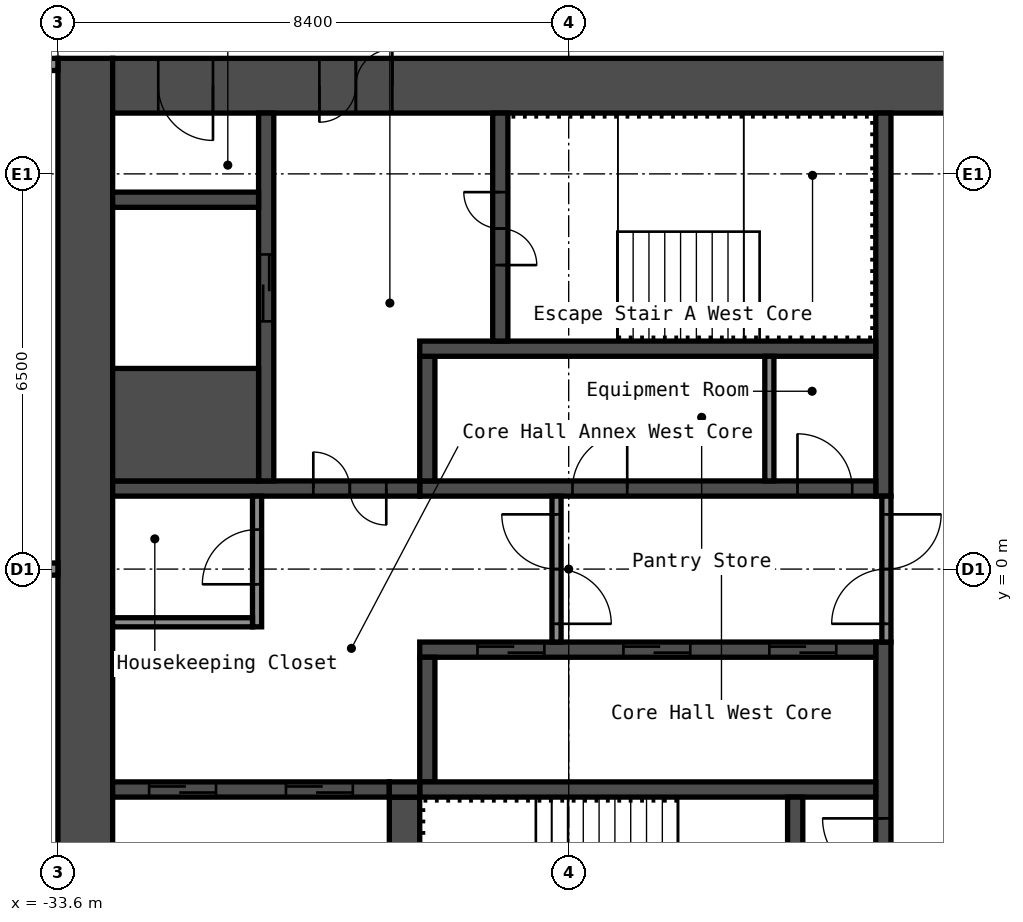
"""IFC4 building model, lengths in metres.
Left out: names, types, materials, properties, quantities, classifications, styles, units other than length and angle.
Written with IfcOpenShell. Run it as: python <this file> out.ifc"""

import sys

from ifc_helpers import new_model, si_unit, direction, frame, frame_2d, origin, place, context, subcontext, project, spatial, rectangle, extrude, element, fill, save


model = new_model("IFC4")
c1 = context("Model", 3, precision=1e-05, world=origin(), true_north=direction((0.0, 1.0)))
c2 = subcontext(c1, "Body", "Model", "MODEL_VIEW")
j1 = project(units=[si_unit("LENGTHUNIT", "METRE"), si_unit("PLANEANGLEUNIT", "RADIAN")], contexts=[c1])
p1 = place(None, origin())
s1 = spatial("IfcSite", under=j1, at=p1, CompositionType="ELEMENT")
p2 = place(p1, origin())
s2 = spatial("IfcBuilding", under=s1, at=p2, CompositionType="ELEMENT")
p3 = place(p2, frame((0.0, 0.0, 172.6)))
s3 = spatial("IfcBuildingStorey", under=s2, at=p3, CompositionType="ELEMENT", Elevation=172.6)
p4 = place(p3, frame((-33.15, -8.4, 0.0), z_axis=(0.0, 0.0, 1.0), x_axis=(0.0, 1.0, 0.0)))
e1 = element("IfcWall", 1, at=p4, inside=s3, PredefinedType="SHEAR", context=c2, shape_type="SweptSolid", body=[
    extrude(rectangle(XDim=16.8, YDim=0.9, at=frame_2d((8.4, 0.0))), origin(), (0.0, 0.0, 1.0), 2.9),
])
p5 = place(p3, frame((-32.7, 7.95, 0.0), z_axis=(0.0, 0.0, 1.0), x_axis=(1.0, 0.0, 0.0)))
e2 = element("IfcWall", 2, at=p5, inside=s3, PredefinedType="SHEAR", context=c2, shape_type="SweptSolid", body=[
    extrude(rectangle(XDim=15.0, YDim=0.9, at=frame_2d((7.5, 0.0))), origin(), (0.0, 0.0, 1.0), 2.9),
])
p6 = place(p5, frame((3.4, 0.0, 0.0)))
e3 = element("IfcOpeningElement", 3, at=p6, cuts=e2, PredefinedType="OPENING", context=c2, shape_type="SweptSolid", body=[
    extrude(rectangle(XDim=1.2, YDim=2.1, at=frame_2d((0.6, 1.05))), frame((0.0, 0.46, 0.0), z_axis=(0.0, -1.0, 0.0), x_axis=(1.0, 0.0, 0.0)), (0.0, 0.0, 1.0), 0.92),
])
p7 = place(p5, frame((0.75, 0.0, 0.0)))
e4 = element("IfcOpeningElement", 4, at=p7, cuts=e2, PredefinedType="OPENING", context=c2, shape_type="SweptSolid", body=[
    extrude(rectangle(XDim=0.9, YDim=2.1, at=frame_2d((0.45, 1.05))), frame((0.0, 0.46, 0.0), z_axis=(0.0, -1.0, 0.0), x_axis=(1.0, 0.0, 0.0)), (0.0, 0.0, 1.0), 0.92),
])
p8 = place(p3, frame((-20.025, 1.2, 0.0), z_axis=(0.0, 0.0, 1.0), x_axis=(0.0, 1.0, 0.0)))
e5 = element("IfcWall", 5, at=p8, inside=s3, PredefinedType="SHEAR", context=c2, shape_type="SweptSolid", body=[
    extrude(rectangle(XDim=6.3, YDim=0.25, at=frame_2d((3.15, 0.0))), origin(), (0.0, 0.0, 1.0), 2.9),
])
p9 = place(p3, frame((-20.025, -7.5, 0.0), z_axis=(0.0, 0.0, 1.0), x_axis=(0.0, 1.0, 0.0)))
e6 = element("IfcWall", 6, at=p9, inside=s3, PredefinedType="SHEAR", context=c2, shape_type="SweptSolid", body=[
    extrude(rectangle(XDim=6.3, YDim=0.25, at=frame_2d((3.15, 0.0))), origin(), (0.0, 0.0, 1.0), 2.9),
])
p10 = place(p9, frame((2.4, 0.0, 0.0)))
e7 = element("IfcOpeningElement", 7, at=p10, cuts=e6, PredefinedType="OPENING", context=c2, shape_type="SweptSolid", body=[
    extrude(rectangle(XDim=1.0, YDim=2.1, at=frame_2d((0.5, 1.05))), frame((0.0, 0.135, 0.0), z_axis=(0.0, -1.0, 0.0), x_axis=(1.0, 0.0, 0.0)), (0.0, 0.0, 1.0), 0.27),
])
p11 = place(p3, frame((-27.65, 1.325, 0.0), z_axis=(0.0, 0.0, 1.0), x_axis=(1.0, 0.0, 0.0)))
e8 = element("IfcWall", 8, at=p11, inside=s3, PredefinedType="SHEAR", context=c2, shape_type="SweptSolid", body=[
    extrude(rectangle(XDim=7.5, YDim=0.25, at=frame_2d((3.75, 0.0))), origin(), (0.0, 0.0, 1.0), 2.9),
])
p12 = place(p11, frame((6.212, 0.0, 0.0)))
e9 = element("IfcOpeningElement", 9, at=p12, cuts=e8, PredefinedType="OPENING", context=c2, shape_type="SweptSolid", body=[
    extrude(rectangle(XDim=0.9, YDim=2.1, at=frame_2d((0.45, 1.05))), frame((0.0, 0.135, 0.0), z_axis=(0.0, -1.0, 0.0), x_axis=(1.0, 0.0, 0.0)), (0.0, 0.0, 1.0), 0.27),
])
p13 = place(p11, frame((2.512, 0.0, 0.0)))
e10 = element("IfcOpeningElement", 10, at=p13, cuts=e8, PredefinedType="OPENING", context=c2, shape_type="SweptSolid", body=[
    extrude(rectangle(XDim=0.9, YDim=2.1, at=frame_2d((0.45, 1.05))), frame((0.0, 0.135, 0.0), z_axis=(0.0, -1.0, 0.0), x_axis=(1.0, 0.0, 0.0)), (0.0, 0.0, 1.0), 0.27),
])
p14 = place(p3, frame((-27.525, 1.45, 0.0), z_axis=(0.0, 0.0, 1.0), x_axis=(0.0, 1.0, 0.0)))
e11 = element("IfcWall", 11, at=p14, inside=s3, PredefinedType="SHEAR", context=c2, shape_type="SweptSolid", body=[
    extrude(rectangle(XDim=2.05, YDim=0.25, at=frame_2d((1.025, 0.0))), origin(), (0.0, 0.0, 1.0), 2.9),
])
p15 = place(p3, frame((-27.65, 3.625, 0.0), z_axis=(0.0, 0.0, 1.0), x_axis=(1.0, 0.0, 0.0)))
e12 = element("IfcWall", 12, at=p15, inside=s3, PredefinedType="SHEAR", context=c2, shape_type="SweptSolid", body=[
    extrude(rectangle(XDim=7.5, YDim=0.25, at=frame_2d((3.75, 0.0))), origin(), (0.0, 0.0, 1.0), 2.9),
])
p16 = place(p3, frame((-26.325, 3.75, 0.0), z_axis=(0.0, 0.0, 1.0), x_axis=(0.0, 1.0, 0.0)))
e13 = element("IfcWall", 13, at=p16, inside=s3, PredefinedType="SHEAR", context=c2, shape_type="SweptSolid", body=[
    extrude(rectangle(XDim=3.75, YDim=0.25, at=frame_2d((1.875, 0.0))), origin(), (0.0, 0.0, 1.0), 2.9),
])
p17 = place(p16, frame((1.25, 0.0, 0.0)))
e14 = element("IfcOpeningElement", 14, at=p17, cuts=e13, PredefinedType="OPENING", context=c2, shape_type="SweptSolid", body=[
    extrude(rectangle(XDim=1.2, YDim=2.1, at=frame_2d((0.6, 1.05))), frame((0.0, 0.135, 0.0), z_axis=(0.0, -1.0, 0.0), x_axis=(1.0, 0.0, 0.0)), (0.0, 0.0, 1.0), 0.27),
])
p18 = place(p3, frame((-32.7, 1.325, 0.0), z_axis=(0.0, 0.0, 1.0), x_axis=(1.0, 0.0, 0.0)))
e15 = element("IfcWall", 15, at=p18, inside=s3, PredefinedType="SHEAR", context=c2, shape_type="SweptSolid", body=[
    extrude(rectangle(XDim=5.05, YDim=0.25, at=frame_2d((2.525, 0.0))), origin(), (0.0, 0.0, 1.0), 2.9),
])
p19 = place(p18, frame((3.3, 0.0, 0.0)))
e16 = element("IfcOpeningElement", 16, at=p19, cuts=e15, PredefinedType="OPENING", context=c2, shape_type="SweptSolid", body=[
    extrude(rectangle(XDim=1.2, YDim=2.1, at=frame_2d((0.6, 1.05))), frame((0.0, 0.135, 0.0), z_axis=(0.0, -1.0, 0.0), x_axis=(1.0, 0.0, 0.0)), (0.0, 0.0, 1.0), 0.27),
])
p20 = place(p3, frame((-30.175, 1.45, 0.0), z_axis=(0.0, 0.0, 1.0), x_axis=(0.0, 1.0, 0.0)))
e17 = element("IfcWall", 17, at=p20, inside=s3, PredefinedType="SHEAR", context=c2, shape_type="SweptSolid", body=[
    extrude(rectangle(XDim=6.05, YDim=0.25, at=frame_2d((3.025, 0.0))), origin(), (0.0, 0.0, 1.0), 2.9),
])
p21 = place(p20, frame((2.625, 0.0, 0.0)))
e18 = element("IfcOpeningElement", 18, at=p21, cuts=e17, PredefinedType="OPENING", context=c2, shape_type="SweptSolid", body=[
    extrude(rectangle(XDim=1.1, YDim=2.1, at=frame_2d((0.55, 1.05))), frame((0.0, 0.135, 0.0), z_axis=(0.0, -1.0, 0.0), x_axis=(1.0, 0.0, 0.0)), (0.0, 0.0, 1.0), 0.27),
])
p22 = place(p3, frame((-32.7, 2.375, 0.0), z_axis=(0.0, 0.0, 1.0), x_axis=(1.0, 0.0, 0.0)))
e19 = element("IfcWall", 19, at=p22, inside=s3, PredefinedType="SHEAR", context=c2, shape_type="SweptSolid", body=[
    extrude(rectangle(XDim=2.4, YDim=1.85, at=frame_2d((1.2, 0.0))), origin(), (0.0, 0.0, 1.0), 2.9),
])
p23 = place(p3, frame((-32.7, 6.075, 0.0), z_axis=(0.0, 0.0, 1.0), x_axis=(1.0, 0.0, 0.0)))
e20 = element("IfcWall", 20, at=p23, inside=s3, PredefinedType="SHEAR", context=c2, shape_type="SweptSolid", body=[
    extrude(rectangle(XDim=2.4, YDim=0.25, at=frame_2d((1.2, 0.0))), origin(), (0.0, 0.0, 1.0), 2.9),
])
p24 = place(p3, frame((-27.65, -1.325, 0.0), z_axis=(0.0, 0.0, 1.0), x_axis=(1.0, 0.0, 0.0)))
e21 = element("IfcWall", 21, at=p24, inside=s3, PredefinedType="SHEAR", context=c2, shape_type="SweptSolid", body=[
    extrude(rectangle(XDim=7.5, YDim=0.25, at=frame_2d((3.75, 0.0))), origin(), (0.0, 0.0, 1.0), 2.9),
])
p25 = place(p24, frame((5.75, 0.0, 0.0)))
e22 = element("IfcOpeningElement", 22, at=p25, cuts=e21, PredefinedType="OPENING", context=c2, shape_type="SweptSolid", body=[
    extrude(rectangle(XDim=1.1, YDim=2.1, at=frame_2d((0.55, 1.05))), frame((0.0, 0.135, 0.0), z_axis=(0.0, -1.0, 0.0), x_axis=(1.0, 0.0, 0.0)), (0.0, 0.0, 1.0), 0.27),
])
p26 = place(p24, frame((3.35, 0.0, 0.0)))
e23 = element("IfcOpeningElement", 23, at=p26, cuts=e21, PredefinedType="OPENING", context=c2, shape_type="SweptSolid", body=[
    extrude(rectangle(XDim=1.1, YDim=2.1, at=frame_2d((0.55, 1.05))), frame((0.0, 0.135, 0.0), z_axis=(0.0, -1.0, 0.0), x_axis=(1.0, 0.0, 0.0)), (0.0, 0.0, 1.0), 0.27),
])
p27 = place(p24, frame((0.95, 0.0, 0.0)))
e24 = element("IfcOpeningElement", 24, at=p27, cuts=e21, PredefinedType="OPENING", context=c2, shape_type="SweptSolid", body=[
    extrude(rectangle(XDim=1.1, YDim=2.1, at=frame_2d((0.55, 1.05))), frame((0.0, 0.135, 0.0), z_axis=(0.0, -1.0, 0.0), x_axis=(1.0, 0.0, 0.0)), (0.0, 0.0, 1.0), 0.27),
])
p28 = place(p3, frame((-27.525, -3.5, 0.0), z_axis=(0.0, 0.0, 1.0), x_axis=(0.0, 1.0, 0.0)))
e25 = element("IfcWall", 25, at=p28, inside=s3, PredefinedType="SHEAR", context=c2, shape_type="SweptSolid", body=[
    extrude(rectangle(XDim=2.05, YDim=0.25, at=frame_2d((1.025, 0.0))), origin(), (0.0, 0.0, 1.0), 2.9),
])
p29 = place(p3, frame((-27.65, -3.625, 0.0), z_axis=(0.0, 0.0, 1.0), x_axis=(1.0, 0.0, 0.0)))
e26 = element("IfcWall", 26, at=p29, inside=s3, PredefinedType="SHEAR", context=c2, shape_type="SweptSolid", body=[
    extrude(rectangle(XDim=7.5, YDim=0.25, at=frame_2d((3.75, 0.0))), origin(), (0.0, 0.0, 1.0), 2.9),
])
p30 = place(p3, frame((-21.475, -7.5, 0.0), z_axis=(0.0, 0.0, 1.0), x_axis=(0.0, 1.0, 0.0)))
e27 = element("IfcWall", 27, at=p30, inside=s3, PredefinedType="SHEAR", context=c2, shape_type="SweptSolid", body=[
    extrude(rectangle(XDim=3.75, YDim=0.25, at=frame_2d((1.875, 0.0))), origin(), (0.0, 0.0, 1.0), 2.9),
])
p31 = place(p30, frame((1.3, 0.0, 0.0)))
e28 = element("IfcOpeningElement", 28, at=p31, cuts=e27, PredefinedType="OPENING", context=c2, shape_type="SweptSolid", body=[
    extrude(rectangle(XDim=1.2, YDim=2.1, at=frame_2d((0.6, 1.05))), frame((0.0, 0.135, 0.0), z_axis=(0.0, -1.0, 0.0), x_axis=(1.0, 0.0, 0.0)), (0.0, 0.0, 1.0), 0.27),
])
p32 = place(p3, frame((-27.9, -7.5, 0.0), z_axis=(0.0, 0.0, 1.0), x_axis=(0.0, 1.0, 0.0)))
e29 = element("IfcWall", 29, at=p32, inside=s3, PredefinedType="SHEAR", context=c2, shape_type="SweptSolid", body=[
    extrude(rectangle(XDim=3.75, YDim=0.5, at=frame_2d((1.875, 0.0))), origin(), (0.0, 0.0, 1.0), 2.9),
])
p33 = place(p3, frame((-32.7, -3.625, 0.0), z_axis=(0.0, 0.0, 1.0), x_axis=(1.0, 0.0, 0.0)))
e30 = element("IfcWall", 30, at=p33, inside=s3, PredefinedType="SHEAR", context=c2, shape_type="SweptSolid", body=[
    extrude(rectangle(XDim=4.55, YDim=0.25, at=frame_2d((2.275, 0.0))), origin(), (0.0, 0.0, 1.0), 2.9),
])
p34 = place(p33, frame((2.85, 0.0, 0.0)))
e31 = element("IfcOpeningElement", 31, at=p34, cuts=e30, PredefinedType="OPENING", context=c2, shape_type="SweptSolid", body=[
    extrude(rectangle(XDim=1.1, YDim=2.1, at=frame_2d((0.55, 1.05))), frame((0.0, 0.135, 0.0), z_axis=(0.0, -1.0, 0.0), x_axis=(1.0, 0.0, 0.0)), (0.0, 0.0, 1.0), 0.27),
])
p35 = place(p33, frame((0.6, 0.0, 0.0)))
e32 = element("IfcOpeningElement", 32, at=p35, cuts=e30, PredefinedType="OPENING", context=c2, shape_type="SweptSolid", body=[
    extrude(rectangle(XDim=1.1, YDim=2.1, at=frame_2d((0.55, 1.05))), frame((0.0, 0.135, 0.0), z_axis=(0.0, -1.0, 0.0), x_axis=(1.0, 0.0, 0.0)), (0.0, 0.0, 1.0), 0.27),
])
p36 = place(p3, frame((-28.15, -3.625, 0.0), z_axis=(0.0, 0.0, 1.0), x_axis=(1.0, 0.0, 0.0)))
e33 = element("IfcWall", 33, at=p36, inside=s3, PredefinedType="SHEAR", context=c2, shape_type="SweptSolid", body=[
    extrude(rectangle(XDim=0.5, YDim=0.25, at=frame_2d((0.25, 0.0))), origin(), (0.0, 0.0, 1.0), 2.9),
])
p37 = place(p3, frame((-19.975, -1.2, 0.0), z_axis=(0.0, 0.0, 1.0), x_axis=(0.0, 1.0, 0.0)))
e34 = element("IfcWall", 34, at=p37, inside=s3, PredefinedType="PARTITIONING", context=c2, shape_type="SweptSolid", body=[
    extrude(rectangle(XDim=2.4, YDim=0.15, at=frame_2d((1.2, 0.0))), origin(), (0.0, 0.0, 1.0), 2.9),
])
p38 = place(p37, frame((0.3, 0.0, 0.0)))
e35 = element("IfcOpeningElement", 35, at=p38, cuts=e34, PredefinedType="OPENING", context=c2, shape_type="SweptSolid", body=[
    extrude(rectangle(XDim=1.8, YDim=2.1, at=frame_2d((0.9, 1.05))), frame((0.0, 0.085, 0.0), z_axis=(0.0, -1.0, 0.0), x_axis=(1.0, 0.0, 0.0)), (0.0, 0.0, 1.0), 0.17),
])
p39 = place(p3, frame((-25.4, -1.2, 0.0), z_axis=(0.0, 0.0, 1.0), x_axis=(0.0, 1.0, 0.0)))
e36 = element("IfcWall", 36, at=p39, inside=s3, PredefinedType="PARTITIONING", context=c2, shape_type="SweptSolid", body=[
    extrude(rectangle(XDim=2.4, YDim=0.15, at=frame_2d((1.2, 0.0))), origin(), (0.0, 0.0, 1.0), 2.9),
])
p40 = place(p39, frame((0.3, 0.0, 0.0)))
e37 = element("IfcOpeningElement", 37, at=p40, cuts=e36, PredefinedType="OPENING", context=c2, shape_type="SweptSolid", body=[
    extrude(rectangle(XDim=1.8, YDim=2.1, at=frame_2d((0.9, 1.05))), frame((0.0, 0.085, 0.0), z_axis=(0.0, -1.0, 0.0), x_axis=(1.0, 0.0, 0.0)), (0.0, 0.0, 1.0), 0.17),
])
p41 = place(p3, frame((-30.325, -0.95, 0.0), z_axis=(0.0, 0.0, 1.0), x_axis=(0.0, 1.0, 0.0)))
e38 = element("IfcWall", 38, at=p41, inside=s3, PredefinedType="PARTITIONING", context=c2, shape_type="SweptSolid", body=[
    extrude(rectangle(XDim=2.15, YDim=0.15, at=frame_2d((1.075, 0.0))), origin(), (0.0, 0.0, 1.0), 2.9),
])
p42 = place(p41, frame((0.7, 0.0, 0.0)))
e39 = element("IfcOpeningElement", 39, at=p42, cuts=e38, PredefinedType="OPENING", context=c2, shape_type="SweptSolid", body=[
    extrude(rectangle(XDim=0.9, YDim=2.1, at=frame_2d((0.45, 1.05))), frame((0.0, 0.085, 0.0), z_axis=(0.0, -1.0, 0.0), x_axis=(1.0, 0.0, 0.0)), (0.0, 0.0, 1.0), 0.17),
])
p43 = place(p3, frame((-32.7, -0.875, 0.0), z_axis=(0.0, 0.0, 1.0), x_axis=(1.0, 0.0, 0.0)))
e40 = element("IfcWall", 40, at=p43, inside=s3, PredefinedType="PARTITIONING", context=c2, shape_type="SweptSolid", body=[
    extrude(rectangle(XDim=2.3, YDim=0.15, at=frame_2d((1.15, 0.0))), origin(), (0.0, 0.0, 1.0), 2.9),
])
p44 = place(p3, frame((-21.9, 1.45, 0.0), z_axis=(0.0, 0.0, 1.0), x_axis=(0.0, 1.0, 0.0)))
e41 = element("IfcWall", 41, at=p44, inside=s3, PredefinedType="PARTITIONING", context=c2, shape_type="SweptSolid", body=[
    extrude(rectangle(XDim=2.05, YDim=0.15, at=frame_2d((1.025, 0.0))), origin(), (0.0, 0.0, 1.0), 2.9),
])
p45 = place(p3, frame((-40.1, 0.0, 0.0), z_axis=(0.0, 0.0, 1.0), x_axis=(1.0, 0.0, 0.0)))
e42 = element("IfcWall", 42, at=p45, inside=s3, PredefinedType="PARTITIONING", context=c2, shape_type="SweptSolid", body=[
    extrude(rectangle(XDim=6.5, YDim=0.2, at=frame_2d((3.25, 0.0))), origin(), (0.0, 0.0, 1.0), 2.9),
])
p46 = place(p3, frame((-40.2, 8.3, 0.0), z_axis=(0.0, 0.0, 1.0), x_axis=(1.0, 0.0, 0.0)))
e43 = element("IfcWall", 43, at=p46, inside=s3, PredefinedType="PARTITIONING", context=c2, shape_type="SweptSolid", body=[
    extrude(rectangle(XDim=6.6, YDim=0.2, at=frame_2d((3.3, 0.0))), origin(), (0.0, 0.0, 1.0), 2.9),
])
p47 = place(p46, frame((1.4, 0.0, 0.0)))
e44 = element("IfcOpeningElement", 44, at=p47, cuts=e43, PredefinedType="OPENING", context=c2, shape_type="SweptSolid", body=[
    extrude(rectangle(XDim=0.9, YDim=2.1, at=frame_2d((0.45, 1.05))), frame((0.0, 0.11, 0.0), z_axis=(0.0, -1.0, 0.0), x_axis=(1.0, 0.0, 0.0)), (0.0, 0.0, 1.0), 0.22),
])
p48 = place(p46, frame((4.7, 0.0, 0.0)))
e45 = element("IfcOpeningElement", 45, at=p48, cuts=e43, PredefinedType="OPENING", context=c2, shape_type="SweptSolid", body=[
    extrude(rectangle(XDim=0.9, YDim=2.1, at=frame_2d((0.45, 1.05))), frame((0.0, 0.11, 0.0), z_axis=(0.0, -1.0, 0.0), x_axis=(1.0, 0.0, 0.0)), (0.0, 0.0, 1.0), 0.22),
])
p49 = place(p6, origin())
e46 = element("IfcDoor", 46, at=p49, inside=s3, OperationType="DOUBLE_DOOR_SINGLE_SWING", PredefinedType="DOOR", context=c2, shape_type="SweptSolid", body=[
    extrude(rectangle(XDim=1.2, YDim=2.1, at=frame_2d((0.6, 1.05))), frame((0.0, 0.025, 0.0), z_axis=(0.0, -1.0, 0.0), x_axis=(1.0, 0.0, 0.0)), (0.0, 0.0, 1.0), 0.05),
])
fill(e3, e46)
p50 = place(p7, origin())
e47 = element("IfcDoor", 47, at=p50, inside=s3, OperationType="SINGLE_SWING_RIGHT", PredefinedType="DOOR", context=c2, shape_type="SweptSolid", body=[
    extrude(rectangle(XDim=0.9, YDim=2.1, at=frame_2d((0.45, 1.05))), frame((0.0, 0.025, 0.0), z_axis=(0.0, -1.0, 0.0), x_axis=(1.0, 0.0, 0.0)), (0.0, 0.0, 1.0), 0.05),
])
fill(e4, e47)
p51 = place(p17, origin())
e48 = element("IfcDoor", 48, at=p51, inside=s3, OperationType="DOUBLE_DOOR_SINGLE_SWING", PredefinedType="DOOR", context=c2, shape_type="SweptSolid", body=[
    extrude(rectangle(XDim=1.2, YDim=2.1, at=frame_2d((0.6, 1.05))), frame((0.0, 0.025, 0.0), z_axis=(0.0, -1.0, 0.0), x_axis=(1.0, 0.0, 0.0)), (0.0, 0.0, 1.0), 0.05),
])
fill(e14, e48)
p52 = place(p10, origin())
e49 = element("IfcDoor", 49, at=p52, inside=s3, OperationType="SINGLE_SWING_LEFT", PredefinedType="DOOR", context=c2, shape_type="SweptSolid", body=[
    extrude(rectangle(XDim=1.0, YDim=2.1, at=frame_2d((0.5, 1.05))), frame((0.0, 0.025, 0.0), z_axis=(0.0, -1.0, 0.0), x_axis=(1.0, 0.0, 0.0)), (0.0, 0.0, 1.0), 0.05),
])
fill(e7, e49)
p53 = place(p19, origin())
e50 = element("IfcDoor", 50, at=p53, inside=s3, OperationType="DOUBLE_DOOR_SINGLE_SWING", PredefinedType="DOOR", context=c2, shape_type="SweptSolid", body=[
    extrude(rectangle(XDim=1.2, YDim=2.1, at=frame_2d((0.6, 1.05))), frame((0.0, 0.025, 0.0), z_axis=(0.0, -1.0, 0.0), x_axis=(1.0, 0.0, 0.0)), (0.0, 0.0, 1.0), 0.05),
])
fill(e16, e50)
p54 = place(p38, origin())
e51 = element("IfcDoor", 51, at=p54, inside=s3, OperationType="DOUBLE_DOOR_SINGLE_SWING", PredefinedType="DOOR", context=c2, shape_type="SweptSolid", body=[
    extrude(rectangle(XDim=1.8, YDim=2.1, at=frame_2d((0.9, 1.05))), frame((0.0, 0.025, 0.0), z_axis=(0.0, -1.0, 0.0), x_axis=(1.0, 0.0, 0.0)), (0.0, 0.0, 1.0), 0.05),
])
fill(e35, e51)
p55 = place(p40, origin())
e52 = element("IfcDoor", 52, at=p55, inside=s3, OperationType="DOUBLE_DOOR_SINGLE_SWING", PredefinedType="DOOR", context=c2, shape_type="SweptSolid", body=[
    extrude(rectangle(XDim=1.8, YDim=2.1, at=frame_2d((0.9, 1.05))), frame((0.0, 0.025, 0.0), z_axis=(0.0, -1.0, 0.0), x_axis=(1.0, 0.0, 0.0)), (0.0, 0.0, 1.0), 0.05),
])
fill(e37, e52)
p56 = place(p42, origin())
e53 = element("IfcDoor", 53, at=p56, inside=s3, OperationType="SINGLE_SWING_RIGHT", PredefinedType="DOOR", context=c2, shape_type="SweptSolid", body=[
    extrude(rectangle(XDim=0.9, YDim=2.1, at=frame_2d((0.45, 1.05))), frame((0.0, 0.025, 0.0), z_axis=(0.0, -1.0, 0.0), x_axis=(1.0, 0.0, 0.0)), (0.0, 0.0, 1.0), 0.05),
])
fill(e39, e53)
p57 = place(p12, origin())
e54 = element("IfcDoor", 54, at=p57, inside=s3, OperationType="SINGLE_SWING_RIGHT", PredefinedType="DOOR", context=c2, shape_type="SweptSolid", body=[
    extrude(rectangle(XDim=0.9, YDim=2.1, at=frame_2d((0.45, 1.05))), frame((0.0, 0.025, 0.0), z_axis=(0.0, -1.0, 0.0), x_axis=(1.0, 0.0, 0.0)), (0.0, 0.0, 1.0), 0.05),
])
fill(e9, e54)
p58 = place(p13, origin())
e55 = element("IfcDoor", 55, at=p58, inside=s3, OperationType="SINGLE_SWING_LEFT", PredefinedType="DOOR", context=c2, shape_type="SweptSolid", body=[
    extrude(rectangle(XDim=0.9, YDim=2.1, at=frame_2d((0.45, 1.05))), frame((0.0, 0.025, 0.0), z_axis=(0.0, -1.0, 0.0), x_axis=(1.0, 0.0, 0.0)), (0.0, 0.0, 1.0), 0.05),
])
fill(e10, e55)
p59 = place(p25, origin())
e56 = element("IfcDoor", 56, at=p59, inside=s3, OperationType="DOUBLE_DOOR_SLIDING", PredefinedType="DOOR", context=c2, shape_type="SweptSolid", body=[
    extrude(rectangle(XDim=1.1, YDim=2.1, at=frame_2d((0.55, 1.05))), frame((0.0, 0.025, 0.0), z_axis=(0.0, -1.0, 0.0), x_axis=(1.0, 0.0, 0.0)), (0.0, 0.0, 1.0), 0.05),
])
fill(e22, e56)
p60 = place(p26, origin())
e57 = element("IfcDoor", 57, at=p60, inside=s3, OperationType="DOUBLE_DOOR_SLIDING", PredefinedType="DOOR", context=c2, shape_type="SweptSolid", body=[
    extrude(rectangle(XDim=1.1, YDim=2.1, at=frame_2d((0.55, 1.05))), frame((0.0, 0.025, 0.0), z_axis=(0.0, -1.0, 0.0), x_axis=(1.0, 0.0, 0.0)), (0.0, 0.0, 1.0), 0.05),
])
fill(e23, e57)
p61 = place(p27, origin())
e58 = element("IfcDoor", 58, at=p61, inside=s3, OperationType="DOUBLE_DOOR_SLIDING", PredefinedType="DOOR", context=c2, shape_type="SweptSolid", body=[
    extrude(rectangle(XDim=1.1, YDim=2.1, at=frame_2d((0.55, 1.05))), frame((0.0, 0.025, 0.0), z_axis=(0.0, -1.0, 0.0), x_axis=(1.0, 0.0, 0.0)), (0.0, 0.0, 1.0), 0.05),
])
fill(e24, e58)
p62 = place(p21, origin())
e59 = element("IfcDoor", 59, at=p62, inside=s3, OperationType="DOUBLE_DOOR_SLIDING", PredefinedType="DOOR", context=c2, shape_type="SweptSolid", body=[
    extrude(rectangle(XDim=1.1, YDim=2.1, at=frame_2d((0.55, 1.05))), frame((0.0, 0.025, 0.0), z_axis=(0.0, -1.0, 0.0), x_axis=(1.0, 0.0, 0.0)), (0.0, 0.0, 1.0), 0.05),
])
fill(e18, e59)
p63 = place(p34, origin())
e60 = element("IfcDoor", 60, at=p63, inside=s3, OperationType="DOUBLE_DOOR_SLIDING", PredefinedType="DOOR", context=c2, shape_type="SweptSolid", body=[
    extrude(rectangle(XDim=1.1, YDim=2.1, at=frame_2d((0.55, 1.05))), frame((0.0, 0.025, 0.0), z_axis=(0.0, -1.0, 0.0), x_axis=(1.0, 0.0, 0.0)), (0.0, 0.0, 1.0), 0.05),
])
fill(e31, e60)
p64 = place(p35, origin())
e61 = element("IfcDoor", 61, at=p64, inside=s3, OperationType="DOUBLE_DOOR_SLIDING", PredefinedType="DOOR", context=c2, shape_type="SweptSolid", body=[
    extrude(rectangle(XDim=1.1, YDim=2.1, at=frame_2d((0.55, 1.05))), frame((0.0, 0.025, 0.0), z_axis=(0.0, -1.0, 0.0), x_axis=(1.0, 0.0, 0.0)), (0.0, 0.0, 1.0), 0.05),
])
fill(e32, e61)
save(model, sys.argv[1])
